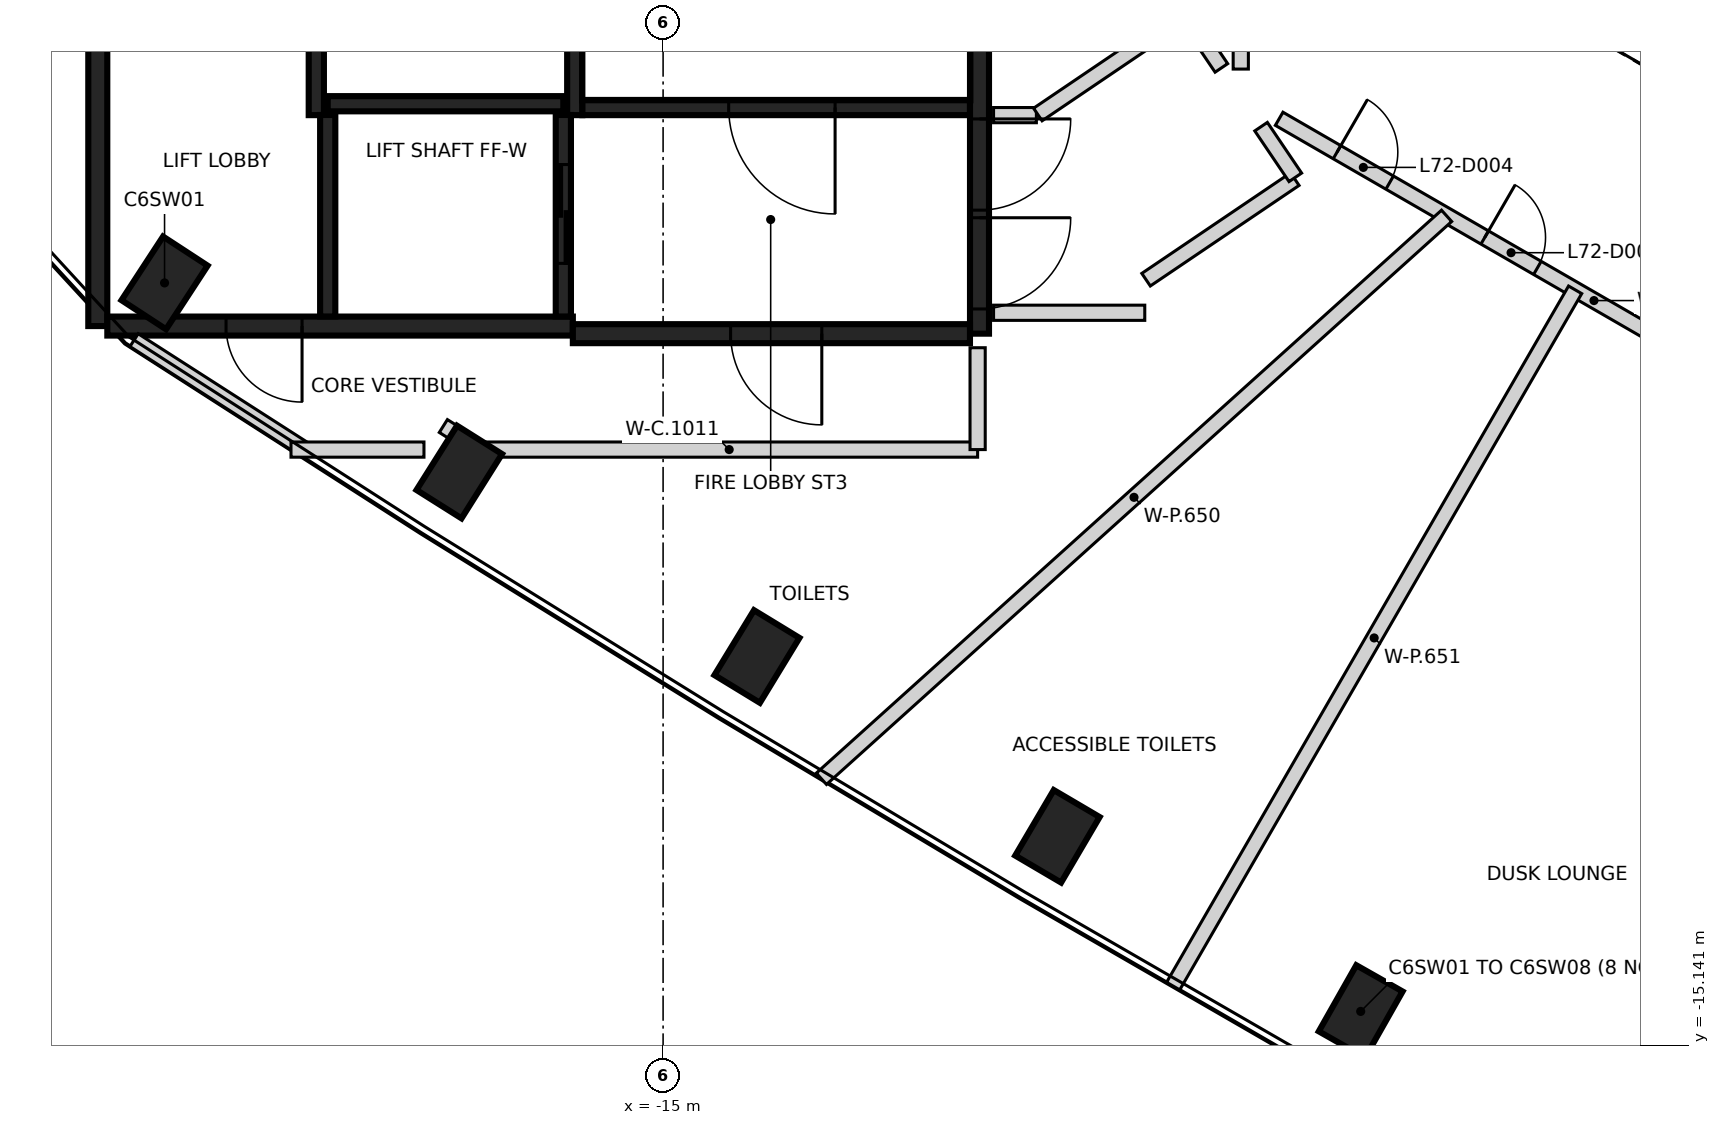
"""IFC4 building model, lengths in metres.
Left out: names, types, materials, properties, quantities, classifications, styles, units other than length and angle.
Written with IfcOpenShell. Run it as: python <this file> out.ifc"""

import sys

from ifc_helpers import new_model, si_unit, direction, frame, frame_2d, origin, origin_2d, place, context, subcontext, project, spatial, rectangle, extrude, element, fill, save


model = new_model("IFC4")
c1 = context("Model", 3, precision=1e-05, world=origin(), true_north=direction((0.0, 1.0)))
c2 = subcontext(c1, "Body", "Model", "MODEL_VIEW")
j1 = project(units=[si_unit("LENGTHUNIT", "METRE"), si_unit("PLANEANGLEUNIT", "RADIAN")], contexts=[c1])
p1 = place(None, origin())
s1 = spatial("IfcSite", under=j1, at=p1, CompositionType="ELEMENT")
p2 = place(p1, origin())
s2 = spatial("IfcBuilding", under=s1, at=p2, CompositionType="ELEMENT")
p3 = place(p2, frame((0.0, 0.0, 283.8)))
s3 = spatial("IfcBuildingStorey", under=s2, at=p3, CompositionType="ELEMENT", Elevation=283.8)
for number, where, z_axis, x_axis in (
    (1, (-21.559, -5.107, -0.35), (0.0, 0.0, 1.0), (0.547, 0.837, 0.0)),
    (2, (-17.681, -7.595, -0.35), (0.0, 0.0, 1.0), (0.533, 0.846, 0.0)),
    (3, (-13.765, -10.022, -0.35), (0.0, 0.0, 1.0), (0.52, 0.854, 0.0)),
    (4, (-9.812, -12.388, -0.35), (0.0, 0.0, 1.0), (0.507, 0.862, 0.0)),
    (5, (-5.822, -14.691, -0.35), (0.0, 0.0, 1.0), (0.493, 0.87, 0.0)),
):
    element("IfcColumn", number, at=place(p3, frame(where, z_axis=z_axis, x_axis=x_axis)), inside=s3, PredefinedType="COLUMN", context=c2, shape_type="SweptSolid", body=[
        extrude(rectangle(XDim=1.0, YDim=0.7, at=origin_2d()), origin(), (0.0, 0.0, 1.0), 7.2),
    ])
p4 = place(p3, frame((-10.837, 5.775, 0.0), z_axis=(0.0, 0.0, 1.0), x_axis=(0.0, -1.0, 0.0)))
e6 = element("IfcWall", 6, at=p4, inside=s3, PredefinedType="SHEAR", context=c2, shape_type="SweptSolid", body=[
    extrude(rectangle(XDim=11.55, YDim=0.25, at=frame_2d((5.775, 0.0))), origin(), (0.0, 0.0, 1.0), 6.85),
])
p5 = place(p4, frame((10.025, 0.0, 0.0)))
e7 = element("IfcOpeningElement", 7, at=p5, cuts=e6, PredefinedType="OPENING", context=c2, shape_type="SweptSolid", body=[
    extrude(rectangle(XDim=1.2, YDim=2.1, at=frame_2d((0.6, 1.05))), frame((0.0, 0.135, 0.0), z_axis=(0.0, -1.0, 0.0), x_axis=(1.0, 0.0, 0.0)), (0.0, 0.0, 1.0), 0.27),
])
p6 = place(p4, frame((8.725, 0.0, 0.0)))
e8 = element("IfcOpeningElement", 8, at=p6, cuts=e6, PredefinedType="OPENING", context=c2, shape_type="SweptSolid", body=[
    extrude(rectangle(XDim=1.2, YDim=2.1, at=frame_2d((0.6, 1.05))), frame((0.0, 0.135, 0.0), z_axis=(0.0, -1.0, 0.0), x_axis=(1.0, 0.0, 0.0)), (0.0, 0.0, 1.0), 0.27),
])
p7 = place(p3, frame((-22.437, -5.675, 0.0), z_axis=(0.0, 0.0, 1.0), x_axis=(0.0, 1.0, 0.0)))
e9 = element("IfcWall", 9, at=p7, inside=s3, PredefinedType="SHEAR", context=c2, shape_type="SweptSolid", body=[
    extrude(rectangle(XDim=8.75, YDim=0.25, at=frame_2d((4.375, 0.0))), origin(), (0.0, 0.0, 1.0), 6.85),
])
p8 = place(p3, frame((-16.187, -5.675, 0.0), z_axis=(0.0, 0.0, 1.0), x_axis=(-1.0, 0.0, 0.0)))
e10 = element("IfcWall", 10, at=p8, inside=s3, PredefinedType="SHEAR", context=c2, shape_type="SweptSolid", body=[
    extrude(rectangle(XDim=6.125, YDim=0.25, at=frame_2d((3.062, 0.0))), origin(), (0.0, 0.0, 1.0), 6.85),
])
p9 = place(p8, frame((3.563, 0.0, 0.0)))
e11 = element("IfcOpeningElement", 11, at=p9, cuts=e10, PredefinedType="OPENING", context=c2, shape_type="SweptSolid", body=[
    extrude(rectangle(XDim=1.0, YDim=2.1, at=frame_2d((0.5, 1.05))), frame((0.0, 0.135, 0.0), z_axis=(0.0, -1.0, 0.0), x_axis=(1.0, 0.0, 0.0)), (0.0, 0.0, 1.0), 0.27),
])
p10 = place(p3, frame((-10.963, -5.775, 0.0), z_axis=(0.0, 0.0, 1.0), x_axis=(-1.0, 0.0, 0.0)))
e12 = element("IfcWall", 12, at=p10, inside=s3, PredefinedType="SHEAR", context=c2, shape_type="SweptSolid", body=[
    extrude(rectangle(XDim=5.225, YDim=0.25, at=frame_2d((2.612, 0.0))), origin(), (0.0, 0.0, 1.0), 6.85),
])
p11 = place(p10, frame((1.949, 0.0, 0.0)))
e13 = element("IfcOpeningElement", 13, at=p11, cuts=e12, PredefinedType="OPENING", context=c2, shape_type="SweptSolid", body=[
    extrude(rectangle(XDim=1.2, YDim=2.1, at=frame_2d((0.6, 1.05))), frame((0.0, 0.135, 0.0), z_axis=(0.0, -1.0, 0.0), x_axis=(1.0, 0.0, 0.0)), (0.0, 0.0, 1.0), 0.27),
])
p12 = place(p3, frame((-16.162, 3.074, 0.0), z_axis=(0.0, 0.0, 1.0), x_axis=(0.0, -1.0, 0.0)))
e14 = element("IfcWall", 14, at=p12, inside=s3, PredefinedType="SHEAR", context=c2, shape_type="SweptSolid", body=[
    extrude(rectangle(XDim=5.974, YDim=0.2, at=frame_2d((2.987, 0.0))), origin(), (0.0, 0.0, 1.0), 6.85),
])
p13 = place(p3, frame((-19.562, -2.9, 0.0), z_axis=(0.0, 0.0, 1.0), x_axis=(0.0, 1.0, 0.0)))
e15 = element("IfcWall", 15, at=p13, inside=s3, PredefinedType="SHEAR", context=c2, shape_type="SweptSolid", body=[
    extrude(rectangle(XDim=6.1, YDim=0.2, at=frame_2d((3.05, 0.0))), origin(), (0.0, 0.0, 1.0), 6.85),
])
p14 = place(p3, frame((-10.963, -2.8, 0.0), z_axis=(0.0, 0.0, 1.0), x_axis=(-1.0, 0.0, 0.0)))
e16 = element("IfcWall", 16, at=p14, inside=s3, PredefinedType="SHEAR", context=c2, shape_type="SweptSolid", body=[
    extrude(rectangle(XDim=5.098, YDim=0.2, at=frame_2d((2.549, 0.0))), origin(), (0.0, 0.0, 1.0), 6.85),
])
p15 = place(p14, frame((1.774, 0.0, 0.0)))
e17 = element("IfcOpeningElement", 17, at=p15, cuts=e16, PredefinedType="OPENING", context=c2, shape_type="SweptSolid", body=[
    extrude(rectangle(XDim=1.4, YDim=2.1, at=frame_2d((0.7, 1.05))), frame((0.0, 0.11, 0.0), z_axis=(0.0, -1.0, 0.0), x_axis=(1.0, 0.0, 0.0)), (0.0, 0.0, 1.0), 0.22),
])
p16 = place(p3, frame((-19.412, -2.75, 0.0), z_axis=(0.0, 0.0, 1.0), x_axis=(1.0, 0.0, 0.0)))
e18 = element("IfcWall", 18, at=p16, inside=s3, PredefinedType="SHEAR", context=c2, shape_type="SweptSolid", body=[
    extrude(rectangle(XDim=3.1, YDim=0.2, at=frame_2d((1.55, 0.0))), origin(), (0.0, 0.0, 1.0), 6.85),
])
p17 = place(p3, frame((-16.312, -2.898, 0.0), z_axis=(0.0, 0.0, 1.0), x_axis=(0.0, -1.0, 0.0)))
e19 = element("IfcWall", 19, at=p17, inside=s3, PredefinedType="SHEAR", context=c2, shape_type="SweptSolid", body=[
    extrude(rectangle(XDim=2.651, YDim=0.2, at=frame_2d((1.325, 0.0))), origin(), (0.0, 0.0, 1.0), 6.85),
])
p18 = place(p17, frame((0.652, 0.0, 0.0)))
e20 = element("IfcOpeningElement", 20, at=p18, cuts=e19, PredefinedType="OPENING", context=c2, shape_type="SweptSolid", body=[
    extrude(rectangle(XDim=1.3, YDim=2.1, at=frame_2d((0.65, 1.05))), frame((0.0, 0.11, 0.0), z_axis=(0.0, -1.0, 0.0), x_axis=(1.0, 0.0, 0.0)), (0.0, 0.0, 1.0), 0.22),
])
p19 = place(p3, frame((-19.412, -5.549, 0.0), z_axis=(0.0, 0.0, 1.0), x_axis=(0.0, 1.0, 0.0)))
e21 = element("IfcWall", 21, at=p19, inside=s3, PredefinedType="SHEAR", context=c2, shape_type="SweptSolid", body=[
    extrude(rectangle(XDim=2.651, YDim=0.2, at=frame_2d((1.325, 0.0))), origin(), (0.0, 0.0, 1.0), 6.85),
])
p20 = place(p3, frame((-21.96, -5.86, 0.0), z_axis=(0.0, 0.0, 1.0), x_axis=(0.841722340019, -0.539910642896, 0.0)))
e22 = element("IfcWall", 22, at=p20, inside=s3, PredefinedType="PARTITIONING", context=c2, shape_type="SweptSolid", body=[
    extrude(rectangle(XDim=2.667, YDim=0.2, at=frame_2d((1.333, 0.0))), origin(), (0.0, 0.0, 1.0), 6.85),
])
p21 = place(p3, frame((-19.896, -7.3, 0.0), z_axis=(0.0, 0.0, 1.0), x_axis=(1.0, 0.0, 0.0)))
e23 = element("IfcWall", 23, at=p21, inside=s3, PredefinedType="PARTITIONING", context=c2, shape_type="SweptSolid", body=[
    extrude(rectangle(XDim=1.75, YDim=0.2, at=frame_2d((0.875, 0.0))), origin(), (0.0, 0.0, 1.0), 5.95),
])
p22 = place(p3, frame((-17.891, -6.99, 0.0), z_axis=(0.0, 0.0, 1.0), x_axis=(0.846106660275, -0.533013620312, 0.0)))
e24 = element("IfcWall", 24, at=p22, inside=s3, PredefinedType="PARTITIONING", context=c2, shape_type="SweptSolid", body=[
    extrude(rectangle(XDim=0.582, YDim=0.2, at=frame_2d((0.291, 0.0))), origin(), (0.0, 0.0, 1.0), 6.85),
])
p23 = place(p3, frame((-17.399, -7.3, 0.0), z_axis=(0.0, 0.0, 1.0), x_axis=(1.0, 0.0, 0.0)))
e25 = element("IfcWall", 25, at=p23, inside=s3, PredefinedType="PARTITIONING", context=c2, shape_type="SweptSolid", body=[
    extrude(rectangle(XDim=6.537, YDim=0.2, at=frame_2d((3.269, 0.0))), origin(), (0.0, 0.0, 1.0), 6.85),
])
p24 = place(p3, frame((-10.862, -7.3, 0.0), z_axis=(0.0, 0.0, 1.0), x_axis=(0.0, 1.0, 0.0)))
e26 = element("IfcWall", 26, at=p24, inside=s3, PredefinedType="PARTITIONING", context=c2, shape_type="SweptSolid", body=[
    extrude(rectangle(XDim=1.34, YDim=0.2, at=frame_2d((0.67, 0.0))), origin(), (0.0, 0.0, 1.0), 6.85),
])
p25 = place(p3, frame((-10.652, -5.5, 0.0), z_axis=(0.0, 0.0, 1.0), x_axis=(1.0, 0.0, 0.0)))
e27 = element("IfcWall", 27, at=p25, inside=s3, PredefinedType="PARTITIONING", context=c2, shape_type="SweptSolid", body=[
    extrude(rectangle(XDim=1.989, YDim=0.2, at=frame_2d((0.995, 0.0))), origin(), (0.0, 0.0, 1.0), 6.85),
])
p26 = place(p3, frame((-10.652, -2.9, 0.0), z_axis=(0.0, 0.0, 1.0), x_axis=(1.0, 0.0, 0.0)))
e28 = element("IfcWall", 28, at=p26, inside=s3, PredefinedType="PARTITIONING", context=c2, shape_type="SweptSolid", body=[
    extrude(rectangle(XDim=0.563, YDim=0.2, at=frame_2d((0.282, 0.0))), origin(), (0.0, 0.0, 1.0), 6.85),
])
p27 = place(p3, frame((-10.07, -2.892, 0.0), z_axis=(0.0, 0.0, 1.0), x_axis=(0.828131902324, 0.560533274974, 0.0)))
e29 = element("IfcWall", 29, at=p27, inside=s3, PredefinedType="PARTITIONING", context=c2, shape_type="SweptSolid", body=[
    extrude(rectangle(XDim=2.332, YDim=0.2, at=frame_2d((1.166, 0.0))), origin(), (0.0, 0.0, 1.0), 6.85),
])
p28 = place(p3, frame((-8.646, -5.065, 0.0), z_axis=(0.0, 0.0, 1.0), x_axis=(0.828455481329, 0.560054921821, 0.0)))
e30 = element("IfcWall", 30, at=p28, inside=s3, PredefinedType="PARTITIONING", context=c2, shape_type="SweptSolid", body=[
    extrude(rectangle(XDim=2.362, YDim=0.2, at=frame_2d((1.181, 0.0))), origin(), (0.0, 0.0, 1.0), 6.85),
])
p29 = place(p3, frame((-8.12, -1.591, 0.0), z_axis=(0.0, 0.0, 1.0), x_axis=(0.560048326839, -0.82845993965, 0.0)))
e31 = element("IfcWall", 31, at=p29, inside=s3, PredefinedType="PARTITIONING", context=c2, shape_type="SweptSolid", body=[
    extrude(rectangle(XDim=0.83, YDim=0.2, at=frame_2d((0.415, 0.0))), origin(), (0.0, 0.0, 1.0), 6.85),
])
p30 = place(p3, frame((-7.4, -2.294, 0.0), z_axis=(0.0, 0.0, 1.0), x_axis=(0.0, 1.0, 0.0)))
e32 = element("IfcWall", 32, at=p30, inside=s3, PredefinedType="PARTITIONING", context=c2, shape_type="SweptSolid", body=[
    extrude(rectangle(XDim=4.948, YDim=0.2, at=frame_2d((2.474, 0.0))), origin(), (0.0, 0.0, 1.0), 6.85),
])
p31 = place(p3, frame((-7.133, -3.052, 0.0), z_axis=(0.0, 0.0, 1.0), x_axis=(0.559868666629, -0.828581363613, 0.0)))
e33 = element("IfcWall", 33, at=p31, inside=s3, PredefinedType="PARTITIONING", context=c2, shape_type="SweptSolid", body=[
    extrude(rectangle(XDim=0.805, YDim=0.2, at=frame_2d((0.402, 0.0))), origin(), (0.0, 0.0, 1.0), 6.85),
])
p32 = place(p3, frame((-6.895, -2.948, 0.0), z_axis=(0.0, 0.0, 1.0), x_axis=(0.865991331413, -0.500059010435, 0.0)))
e34 = element("IfcWall", 34, at=p32, inside=s3, PredefinedType="PARTITIONING", context=c2, shape_type="SweptSolid", body=[
    extrude(rectangle(XDim=9.565, YDim=0.2, at=frame_2d((4.783, 0.0))), origin(), (0.0, 0.0, 1.0), 6.85),
])
p33 = place(p32, frame((0.879, 0.0, 0.0)))
e35 = element("IfcOpeningElement", 35, at=p33, cuts=e34, PredefinedType="OPENING", context=c2, shape_type="SweptSolid", body=[
    extrude(rectangle(XDim=0.8, YDim=2.1, at=frame_2d((0.4, 1.05))), frame((0.0, 0.11, 0.0), z_axis=(0.0, -1.0, 0.0), x_axis=(1.0, 0.0, 0.0)), (0.0, 0.0, 1.0), 0.22),
])
p34 = place(p32, frame((3.123, 0.0, 0.0)))
e36 = element("IfcOpeningElement", 36, at=p34, cuts=e34, PredefinedType="OPENING", context=c2, shape_type="SweptSolid", body=[
    extrude(rectangle(XDim=0.8, YDim=2.1, at=frame_2d((0.4, 1.05))), frame((0.0, 0.11, 0.0), z_axis=(0.0, -1.0, 0.0), x_axis=(1.0, 0.0, 0.0)), (0.0, 0.0, 1.0), 0.22),
])
p35 = place(p32, frame((6.526, 0.0, 0.0)))
e37 = element("IfcOpeningElement", 37, at=p35, cuts=e34, PredefinedType="OPENING", context=c2, shape_type="SweptSolid", body=[
    extrude(rectangle(XDim=1.0, YDim=2.1, at=frame_2d((0.5, 1.05))), frame((0.0, 0.11, 0.0), z_axis=(0.0, -1.0, 0.0), x_axis=(1.0, 0.0, 0.0)), (0.0, 0.0, 1.0), 0.22),
])
p36 = place(p3, frame((-12.917, -11.631, 0.0), z_axis=(0.0, 0.0, 1.0), x_axis=(0.743160324176, 0.669113392909, 0.0)))
e38 = element("IfcWall", 38, at=p36, inside=s3, PredefinedType="PARTITIONING", context=c2, shape_type="SweptSolid", body=[
    extrude(rectangle(XDim=11.068, YDim=0.2, at=frame_2d((5.534, 0.0))), origin(), (0.0, 0.0, 1.0), 5.95),
])
p37 = place(p3, frame((-8.289, -14.358, 0.0), z_axis=(0.0, 0.0, 1.0), x_axis=(0.499979535923, 0.866037218403, 0.0)))
e39 = element("IfcWall", 39, at=p37, inside=s3, PredefinedType="PARTITIONING", context=c2, shape_type="SweptSolid", body=[
    extrude(rectangle(XDim=10.577, YDim=0.2, at=frame_2d((5.289, 0.0))), origin(), (0.0, 0.0, 1.0), 5.95),
])
p38 = place(p18, origin())
e40 = element("IfcDoor", 40, at=p38, inside=s3, OperationType="SLIDING_TO_RIGHT", PredefinedType="DOOR", context=c2, shape_type="SweptSolid", body=[
    extrude(rectangle(XDim=1.3, YDim=2.1, at=frame_2d((0.65, 1.05))), frame((0.0, 0.025, 0.0), z_axis=(0.0, -1.0, 0.0), x_axis=(1.0, 0.0, 0.0)), (0.0, 0.0, 1.0), 0.05),
])
fill(e20, e40)
p39 = place(p9, origin())
e41 = element("IfcDoor", 41, at=p39, inside=s3, OperationType="SINGLE_SWING_LEFT", PredefinedType="DOOR", context=c2, shape_type="SweptSolid", body=[
    extrude(rectangle(XDim=1.0, YDim=2.1, at=frame_2d((0.5, 1.05))), frame((0.0, 0.025, 0.0), z_axis=(0.0, -1.0, 0.0), x_axis=(1.0, 0.0, 0.0)), (0.0, 0.0, 1.0), 0.05),
])
fill(e11, e41)
p40 = place(p5, origin())
e42 = element("IfcDoor", 42, at=p40, inside=s3, OperationType="SINGLE_SWING_LEFT", PredefinedType="DOOR", context=c2, shape_type="SweptSolid", body=[
    extrude(rectangle(XDim=1.2, YDim=2.1, at=frame_2d((0.6, 1.05))), frame((0.0, 0.025, 0.0), z_axis=(0.0, -1.0, 0.0), x_axis=(1.0, 0.0, 0.0)), (0.0, 0.0, 1.0), 0.05),
])
fill(e7, e42)
p41 = place(p6, origin())
e43 = element("IfcDoor", 43, at=p41, inside=s3, OperationType="SINGLE_SWING_RIGHT", PredefinedType="DOOR", context=c2, shape_type="SweptSolid", body=[
    extrude(rectangle(XDim=1.2, YDim=2.1, at=frame_2d((0.6, 1.05))), frame((0.0, 0.025, 0.0), z_axis=(0.0, -1.0, 0.0), x_axis=(1.0, 0.0, 0.0)), (0.0, 0.0, 1.0), 0.05),
])
fill(e8, e43)
p42 = place(p11, origin())
e44 = element("IfcDoor", 44, at=p42, inside=s3, OperationType="SINGLE_SWING_LEFT", PredefinedType="DOOR", context=c2, shape_type="SweptSolid", body=[
    extrude(rectangle(XDim=1.2, YDim=2.1, at=frame_2d((0.6, 1.05))), frame((0.0, 0.025, 0.0), z_axis=(0.0, -1.0, 0.0), x_axis=(1.0, 0.0, 0.0)), (0.0, 0.0, 1.0), 0.05),
])
fill(e13, e44)
p43 = place(p15, origin())
e45 = element("IfcDoor", 45, at=p43, inside=s3, OperationType="SINGLE_SWING_LEFT", PredefinedType="DOOR", context=c2, shape_type="SweptSolid", body=[
    extrude(rectangle(XDim=1.4, YDim=2.1, at=frame_2d((0.7, 1.05))), frame((0.0, 0.025, 0.0), z_axis=(0.0, -1.0, 0.0), x_axis=(1.0, 0.0, 0.0)), (0.0, 0.0, 1.0), 0.05),
])
fill(e17, e45)
p44 = place(p33, frame((0.8, 0.0, 0.0), z_axis=(0.0, 0.0, 1.0), x_axis=(-1.0, 0.0, 0.0)))
e46 = element("IfcDoor", 46, at=p44, inside=s3, OperationType="SINGLE_SWING_LEFT", PredefinedType="DOOR", context=c2, shape_type="SweptSolid", body=[
    extrude(rectangle(XDim=0.8, YDim=2.1, at=frame_2d((0.4, 1.05))), frame((0.0, 0.025, 0.0), z_axis=(0.0, -1.0, 0.0), x_axis=(1.0, 0.0, 0.0)), (0.0, 0.0, 1.0), 0.05),
])
fill(e35, e46)
p45 = place(p34, frame((0.8, 0.0, 0.0), z_axis=(0.0, 0.0, 1.0), x_axis=(-1.0, 0.0, 0.0)))
e47 = element("IfcDoor", 47, at=p45, inside=s3, OperationType="SINGLE_SWING_LEFT", PredefinedType="DOOR", context=c2, shape_type="SweptSolid", body=[
    extrude(rectangle(XDim=0.8, YDim=2.1, at=frame_2d((0.4, 1.05))), frame((0.0, 0.025, 0.0), z_axis=(0.0, -1.0, 0.0), x_axis=(1.0, 0.0, 0.0)), (0.0, 0.0, 1.0), 0.05),
])
fill(e36, e47)
save(model, sys.argv[1])
